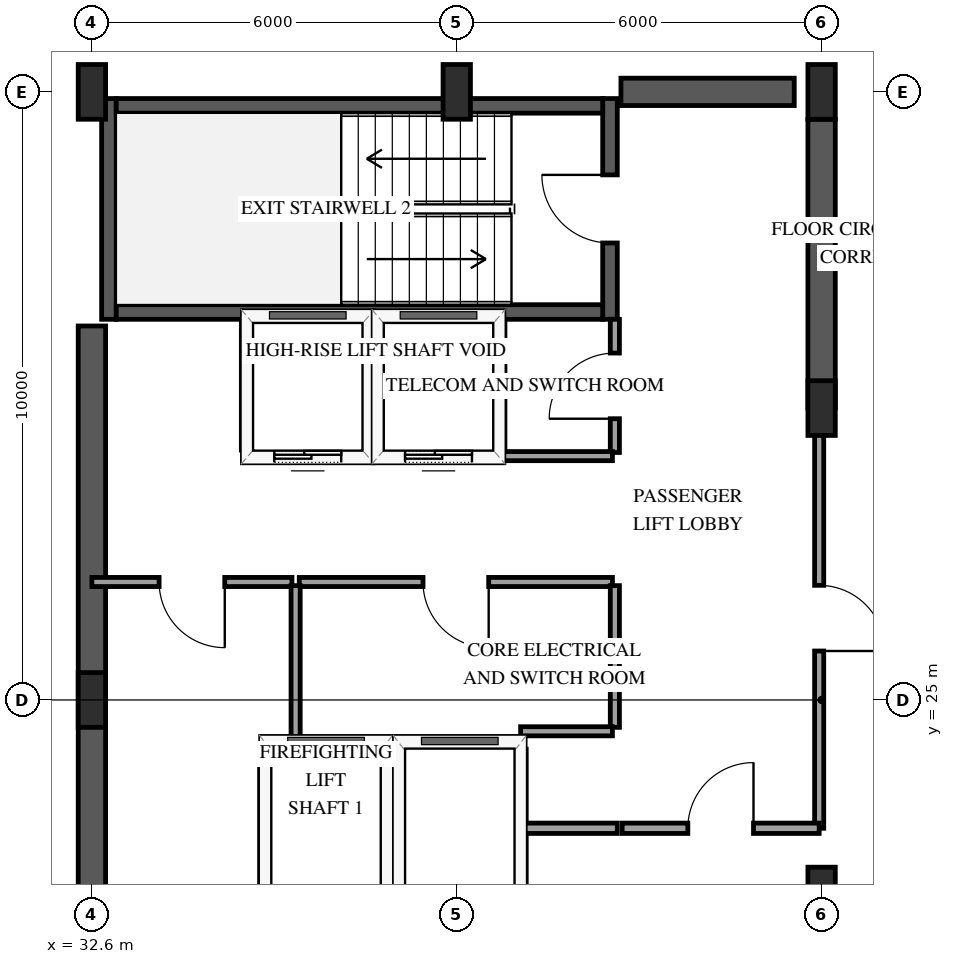
"""IFC4 building model, lengths in metres.
Left out: names, types, materials, properties, quantities, classifications, styles, units other than length and angle.
Written with IfcOpenShell. Run it as: python <this file> out.ifc"""

import sys

from ifc_helpers import new_model, si_unit, direction, frame, frame_2d, origin, origin_2d, place, context, subcontext, project, spatial, rectangle, extrude, element, fill, save


model = new_model("IFC4")
c1 = context("Model", 3, precision=1e-05, world=origin(), true_north=direction((0.0, 1.0)))
c2 = subcontext(c1, "Body", "Model", "MODEL_VIEW")
j1 = project(units=[si_unit("LENGTHUNIT", "METRE"), si_unit("PLANEANGLEUNIT", "RADIAN")], contexts=[c1])
p1 = place(None, origin())
s1 = spatial("IfcSite", under=j1, at=p1, CompositionType="ELEMENT")
p2 = place(p1, origin())
s2 = spatial("IfcBuilding", under=s1, at=p2, CompositionType="ELEMENT")
p3 = place(p2, frame((0.0, 0.0, 272.5)))
s3 = spatial("IfcBuildingStorey", under=s2, at=p3, CompositionType="ELEMENT", Elevation=272.5)
p4 = place(p3, frame((32.88, 31.26, 0.0), z_axis=(0.0, 0.0, 1.0), x_axis=(0.0, 1.0, 0.0)))
e1 = element("IfcWall", 1, at=p4, inside=s3, PredefinedType="SHEAR", context=c2, shape_type="SweptSolid", body=[
    extrude(rectangle(XDim=3.63, YDim=0.24, at=frame_2d((1.815, 0.0))), origin(), (0.0, 0.0, 1.0), 3.75),
])
p5 = place(p3, frame((41.12, 31.26, 0.0), z_axis=(0.0, 0.0, 1.0), x_axis=(0.0, 1.0, 0.0)))
e2 = element("IfcWall", 2, at=p5, inside=s3, PredefinedType="SHEAR", context=c2, shape_type="SweptSolid", body=[
    extrude(rectangle(XDim=3.63, YDim=0.24, at=frame_2d((1.815, 0.0))), origin(), (0.0, 0.0, 1.0), 3.75),
])
p6 = place(p5, frame((1.255, 0.0, 0.0)))
e3 = element("IfcOpeningElement", 3, at=p6, cuts=e2, PredefinedType="OPENING", context=c2, shape_type="SweptSolid", body=[
    extrude(rectangle(XDim=1.12, YDim=2.15, at=frame_2d((0.56, 1.075))), frame((0.0, 0.13, 0.0), z_axis=(0.0, -1.0, 0.0), x_axis=(1.0, 0.0, 0.0)), (0.0, 0.0, 1.0), 0.26),
])
for number, where, z_axis, x_axis in (
    (4, (33.0, 31.38, 0.0), (0.0, 0.0, 1.0), (1.0, 0.0, 0.0)),
    (5, (33.0, 34.77, 0.0), (0.0, 0.0, 1.0), (1.0, 0.0, 0.0)),
):
    element("IfcWall", number, at=place(p3, frame(where, z_axis=z_axis, x_axis=x_axis)), inside=s3, PredefinedType="SHEAR", context=c2, shape_type="SweptSolid", body=[
        extrude(rectangle(XDim=8.0, YDim=0.24, at=frame_2d((4.0, 0.0))), origin(), (0.0, 0.0, 1.0), 3.75),
    ])
p7 = place(p3, frame((32.6, 18.85, 0.0), z_axis=(0.0, 0.0, 1.0), x_axis=(0.0, 1.0, 0.0)))
e6 = element("IfcWall", 6, at=p7, inside=s3, PredefinedType="SHEAR", context=c2, shape_type="SweptSolid", body=[
    extrude(rectangle(XDim=12.3, YDim=0.45, at=frame_2d((6.15, 0.0))), origin(), (0.0, 0.0, 1.0), 3.75),
])
p8 = place(p3, frame((41.3, 35.0, 0.0), z_axis=(0.0, 0.0, 1.0), x_axis=(1.0, 0.0, 0.0)))
e7 = element("IfcWall", 7, at=p8, inside=s3, PredefinedType="SHEAR", context=c2, shape_type="SweptSolid", body=[
    extrude(rectangle(XDim=2.85, YDim=0.45, at=frame_2d((1.425, 0.0))), origin(), (0.0, 0.0, 1.0), 3.75),
])
p9 = place(p3, frame((44.6, 29.8, 0.0), z_axis=(0.0, 0.0, 1.0), x_axis=(0.0, 1.0, 0.0)))
e8 = element("IfcWall", 8, at=p9, inside=s3, PredefinedType="SHEAR", context=c2, shape_type="SweptSolid", body=[
    extrude(rectangle(XDim=4.75, YDim=0.45, at=frame_2d((2.375, 0.0))), origin(), (0.0, 0.0, 1.0), 3.75),
])
for number, where, z_axis, x_axis in (
    (9, (32.6, 25.0, 0.0), (0.0, 0.0, 1.0), (1.0, 0.0, 0.0)),
    (10, (32.6, 35.0, 0.0), (0.0, 0.0, 1.0), (1.0, 0.0, 0.0)),
    (11, (38.6, 35.0, 0.0), (0.0, 0.0, 1.0), (1.0, 0.0, 0.0)),
    (12, (44.6, 21.8, 0.0), (0.0, 0.0, 1.0), (1.0, 0.0, 0.0)),
    (13, (44.6, 29.8, 0.0), (0.0, 0.0, 1.0), (1.0, 0.0, 0.0)),
    (14, (44.6, 35.0, 0.0), (0.0, 0.0, 1.0), (1.0, 0.0, 0.0)),
):
    element("IfcColumn", number, at=place(p3, frame(where, z_axis=z_axis, x_axis=x_axis)), inside=s3, PredefinedType="PILASTER", context=c2, shape_type="SweptSolid", body=[
        extrude(rectangle(XDim=0.45, YDim=0.9, at=origin_2d()), origin(), (0.0, 0.0, 1.0), 3.75),
    ])
p10 = place(p3, frame((35.45, 24.3, 0.0), z_axis=(0.0, 0.0, 1.0), x_axis=(1.0, 0.0, 0.0)))
e15 = element("IfcWall", 15, at=p10, inside=s3, PredefinedType="SOLIDWALL", context=c2, shape_type="SweptSolid", body=[
    extrude(rectangle(XDim=2.0, YDim=0.185, at=frame_2d((1.0, 0.0))), origin(), (0.0, 0.0, 1.0), 3.45),
])
for number, where, z_axis, x_axis in (
    (16, (35.45, 21.81, 0.0), (0.0, 0.0, 1.0), (0.0, 1.0, 0.0)),
    (17, (37.45, 21.81, 0.0), (0.0, 0.0, 1.0), (0.0, 1.0, 0.0)),
):
    element("IfcWall", number, at=place(p3, frame(where, z_axis=z_axis, x_axis=x_axis)), inside=s3, PredefinedType="SOLIDWALL", context=c2, shape_type="SweptSolid", body=[
        extrude(rectangle(XDim=2.38, YDim=0.185, at=frame_2d((1.19, 0.0))), origin(), (0.0, 0.0, 1.0), 3.45),
    ])
p11 = place(p3, frame((37.65, 24.3, 0.0), z_axis=(0.0, 0.0, 1.0), x_axis=(1.0, 0.0, 0.0)))
e18 = element("IfcWall", 18, at=p11, inside=s3, PredefinedType="SOLIDWALL", context=c2, shape_type="SweptSolid", body=[
    extrude(rectangle(XDim=2.0, YDim=0.185, at=frame_2d((1.0, 0.0))), origin(), (0.0, 0.0, 1.0), 3.45),
])
p12 = place(p3, frame((39.65, 21.81, 0.0), z_axis=(0.0, 0.0, 1.0), x_axis=(0.0, 1.0, 0.0)))
e19 = element("IfcWall", 19, at=p12, inside=s3, PredefinedType="SOLIDWALL", context=c2, shape_type="SweptSolid", body=[
    extrude(rectangle(XDim=2.38, YDim=0.185, at=frame_2d((1.19, 0.0))), origin(), (0.0, 0.0, 1.0), 3.45),
])
p13 = place(p3, frame((35.15, 29.0, 0.0), z_axis=(0.0, 0.0, 1.0), x_axis=(1.0, 0.0, 0.0)))
e20 = element("IfcWall", 20, at=p13, inside=s3, PredefinedType="SOLIDWALL", context=c2, shape_type="SweptSolid", body=[
    extrude(rectangle(XDim=2.0, YDim=0.185, at=frame_2d((1.0, 0.0))), origin(), (0.0, 0.0, 1.0), 3.45),
])
p14 = place(p13, frame((0.45, 0.0, 0.0)))
e21 = element("IfcOpeningElement", 21, at=p14, cuts=e20, PredefinedType="OPENING", context=c2, shape_type="SweptSolid", body=[
    extrude(rectangle(XDim=1.1, YDim=2.15, at=frame_2d((0.55, 1.075))), frame((0.0, 0.103, 0.0), z_axis=(0.0, -1.0, 0.0), x_axis=(1.0, 0.0, 0.0)), (0.0, 0.0, 1.0), 0.205),
])
for number, where, z_axis, x_axis in (
    (22, (35.15, 29.11, 0.0), (0.0, 0.0, 1.0), (0.0, 1.0, 0.0)),
    (23, (37.15, 29.11, 0.0), (0.0, 0.0, 1.0), (0.0, 1.0, 0.0)),
):
    element("IfcWall", number, at=place(p3, frame(where, z_axis=z_axis, x_axis=x_axis)), inside=s3, PredefinedType="SOLIDWALL", context=c2, shape_type="SweptSolid", body=[
        extrude(rectangle(XDim=2.1, YDim=0.185, at=frame_2d((1.05, 0.0))), origin(), (0.0, 0.0, 1.0), 3.45),
    ])
p15 = place(p3, frame((37.3, 29.0, 0.0), z_axis=(0.0, 0.0, 1.0), x_axis=(1.0, 0.0, 0.0)))
e24 = element("IfcWall", 24, at=p15, inside=s3, PredefinedType="SOLIDWALL", context=c2, shape_type="SweptSolid", body=[
    extrude(rectangle(XDim=2.0, YDim=0.185, at=frame_2d((1.0, 0.0))), origin(), (0.0, 0.0, 1.0), 3.45),
])
p16 = place(p15, frame((0.45, 0.0, 0.0)))
e25 = element("IfcOpeningElement", 25, at=p16, cuts=e24, PredefinedType="OPENING", context=c2, shape_type="SweptSolid", body=[
    extrude(rectangle(XDim=1.1, YDim=2.15, at=frame_2d((0.55, 1.075))), frame((0.0, 0.103, 0.0), z_axis=(0.0, -1.0, 0.0), x_axis=(1.0, 0.0, 0.0)), (0.0, 0.0, 1.0), 0.205),
])
p17 = place(p3, frame((39.3, 29.11, 0.0), z_axis=(0.0, 0.0, 1.0), x_axis=(0.0, 1.0, 0.0)))
e26 = element("IfcWall", 26, at=p17, inside=s3, PredefinedType="SOLIDWALL", context=c2, shape_type="SweptSolid", body=[
    extrude(rectangle(XDim=2.1, YDim=0.185, at=frame_2d((1.05, 0.0))), origin(), (0.0, 0.0, 1.0), 3.45),
])
p18 = place(p3, frame((44.56, 29.8, 0.0), z_axis=(0.0, 0.0, 1.0), x_axis=(0.0, -1.0, 0.0)))
e27 = element("IfcWall", 27, at=p18, inside=s3, PredefinedType="PARTITIONING", context=c2, shape_type="SweptSolid", body=[
    extrude(rectangle(XDim=6.91, YDim=0.15, at=frame_2d((3.455, 0.0))), origin(), (0.0, 0.0, 1.0), 2.49),
])
p19 = place(p18, frame((2.915, 0.0, 0.0)))
e28 = element("IfcOpeningElement", 28, at=p19, cuts=e27, PredefinedType="OPENING", context=c2, shape_type="SweptSolid", body=[
    extrude(rectangle(XDim=1.08, YDim=2.15, at=frame_2d((0.54, 1.075))), frame((0.0, 0.085, 0.0), z_axis=(0.0, -1.0, 0.0), x_axis=(1.0, 0.0, 0.0)), (0.0, 0.0, 1.0), 0.17),
])
p20 = place(p3, frame((41.16, 26.94, 0.0), z_axis=(0.0, 0.0, 1.0), x_axis=(-1.0, 0.0, 0.0)))
e29 = element("IfcWall", 29, at=p20, inside=s3, PredefinedType="PARTITIONING", context=c2, shape_type="SweptSolid", body=[
    extrude(rectangle(XDim=5.15, YDim=0.15, at=frame_2d((2.575, 0.0))), origin(), (0.0, 0.0, 1.0), 3.45),
])
p21 = place(p20, frame((2.035, 0.0, 0.0)))
e30 = element("IfcOpeningElement", 30, at=p21, cuts=e29, PredefinedType="OPENING", context=c2, shape_type="SweptSolid", body=[
    extrude(rectangle(XDim=1.08, YDim=2.15, at=frame_2d((0.54, 1.075))), frame((0.0, 0.085, 0.0), z_axis=(0.0, -1.0, 0.0), x_axis=(1.0, 0.0, 0.0)), (0.0, 0.0, 1.0), 0.17),
])
p22 = place(p3, frame((35.89, 26.94, 0.0), z_axis=(0.0, 0.0, 1.0), x_axis=(-1.0, 0.0, 0.0)))
e31 = element("IfcWall", 31, at=p22, inside=s3, PredefinedType="PARTITIONING", context=c2, shape_type="SweptSolid", body=[
    extrude(rectangle(XDim=3.29, YDim=0.15, at=frame_2d((1.645, 0.0))), origin(), (0.0, 0.0, 1.0), 3.45),
])
p23 = place(p22, frame((1.105, 0.0, 0.0)))
e32 = element("IfcOpeningElement", 32, at=p23, cuts=e31, PredefinedType="OPENING", context=c2, shape_type="SweptSolid", body=[
    extrude(rectangle(XDim=1.08, YDim=2.15, at=frame_2d((0.54, 1.075))), frame((0.0, 0.085, 0.0), z_axis=(0.0, -1.0, 0.0), x_axis=(1.0, 0.0, 0.0)), (0.0, 0.0, 1.0), 0.17),
])
p24 = place(p3, frame((41.32, 22.89, 0.0), z_axis=(0.0, 0.0, 1.0), x_axis=(1.0, 0.0, 0.0)))
e33 = element("IfcWall", 33, at=p24, inside=s3, PredefinedType="PARTITIONING", context=c2, shape_type="SweptSolid", body=[
    extrude(rectangle(XDim=3.24, YDim=0.17, at=frame_2d((1.62, 0.0))), origin(), (0.0, 0.0, 1.0), 3.45),
])
p25 = place(p24, frame((1.08, 0.0, 0.0)))
e34 = element("IfcOpeningElement", 34, at=p25, cuts=e33, PredefinedType="OPENING", context=c2, shape_type="SweptSolid", body=[
    extrude(rectangle(XDim=1.08, YDim=2.15, at=frame_2d((0.54, 1.075))), frame((0.0, 0.095, 0.0), z_axis=(0.0, -1.0, 0.0), x_axis=(1.0, 0.0, 0.0)), (0.0, 0.0, 1.0), 0.19),
])
p26 = place(p3, frame((35.95, 26.88, 0.0), z_axis=(0.0, 0.0, 1.0), x_axis=(0.0, -1.0, 0.0)))
e35 = element("IfcWall", 35, at=p26, inside=s3, PredefinedType="PARTITIONING", context=c2, shape_type="SweptSolid", body=[
    extrude(rectangle(XDim=2.58, YDim=0.15, at=frame_2d((1.29, 0.0))), origin(), (0.0, 0.0, 1.0), 3.45),
])
p27 = place(p3, frame((41.2, 24.55, 0.0), z_axis=(0.0, 0.0, 1.0), x_axis=(0.0, 1.0, 0.0)))
e36 = element("IfcWall", 36, at=p27, inside=s3, PredefinedType="PARTITIONING", context=c2, shape_type="SweptSolid", body=[
    extrude(rectangle(XDim=2.33, YDim=0.15, at=frame_2d((1.165, 0.0))), origin(), (0.0, 0.0, 1.0), 3.45),
])
p28 = place(p3, frame((41.2, 29.07, 0.0), z_axis=(0.0, 0.0, 1.0), x_axis=(0.0, 1.0, 0.0)))
e37 = element("IfcWall", 37, at=p28, inside=s3, PredefinedType="PARTITIONING", context=c2, shape_type="SweptSolid", body=[
    extrude(rectangle(XDim=2.19, YDim=0.15, at=frame_2d((1.095, 0.0))), origin(), (0.0, 0.0, 1.0), 3.45),
])
p29 = place(p28, frame((0.555, 0.0, 0.0)))
e38 = element("IfcOpeningElement", 38, at=p29, cuts=e37, PredefinedType="OPENING", context=c2, shape_type="SweptSolid", body=[
    extrude(rectangle(XDim=1.08, YDim=2.15, at=frame_2d((0.54, 1.075))), frame((0.0, 0.085, 0.0), z_axis=(0.0, -1.0, 0.0), x_axis=(1.0, 0.0, 0.0)), (0.0, 0.0, 1.0), 0.17),
])
p30 = place(p3, frame((39.3, 29.01, 0.0), z_axis=(0.0, 0.0, 1.0), x_axis=(1.0, 0.0, 0.0)))
e39 = element("IfcWall", 39, at=p30, inside=s3, PredefinedType="PARTITIONING", context=c2, shape_type="SweptSolid", body=[
    extrude(rectangle(XDim=1.86, YDim=0.15, at=frame_2d((0.93, 0.0))), origin(), (0.0, 0.0, 1.0), 3.45),
])
p31 = place(p3, frame((39.72, 22.89, 0.0), z_axis=(0.0, 0.0, 1.0), x_axis=(1.0, 0.0, 0.0)))
e40 = element("IfcWall", 40, at=p31, inside=s3, PredefinedType="PARTITIONING", context=c2, shape_type="SweptSolid", body=[
    extrude(rectangle(XDim=1.52, YDim=0.17, at=frame_2d((0.76, 0.0))), origin(), (0.0, 0.0, 1.0), 3.45),
])
p32 = place(p3, frame((39.65, 24.485, 0.0), z_axis=(0.0, 0.0, 1.0), x_axis=(1.0, 0.0, 0.0)))
e41 = element("IfcWall", 41, at=p32, inside=s3, PredefinedType="PARTITIONING", context=c2, shape_type="SweptSolid", body=[
    extrude(rectangle(XDim=1.51, YDim=0.15, at=frame_2d((0.755, 0.0))), origin(), (0.0, 0.0, 1.0), 3.45),
])
p33 = place(p14, origin())
e42 = element("IfcDoor", 42, at=p33, inside=s3, OperationType="SLIDING_TO_LEFT", PredefinedType="DOOR", context=c2, shape_type="SweptSolid", body=[
    extrude(rectangle(XDim=1.1, YDim=2.15, at=frame_2d((0.55, 1.075))), frame((0.0, 0.025, 0.0), z_axis=(0.0, -1.0, 0.0), x_axis=(1.0, 0.0, 0.0)), (0.0, 0.0, 1.0), 0.05),
])
fill(e21, e42)
p34 = place(p16, origin())
e43 = element("IfcDoor", 43, at=p34, inside=s3, OperationType="SLIDING_TO_LEFT", PredefinedType="DOOR", context=c2, shape_type="SweptSolid", body=[
    extrude(rectangle(XDim=1.1, YDim=2.15, at=frame_2d((0.55, 1.075))), frame((0.0, 0.025, 0.0), z_axis=(0.0, -1.0, 0.0), x_axis=(1.0, 0.0, 0.0)), (0.0, 0.0, 1.0), 0.05),
])
fill(e25, e43)
p35 = place(p6, origin())
e44 = element("IfcDoor", 44, at=p35, inside=s3, OperationType="SINGLE_SWING_RIGHT", PredefinedType="DOOR", context=c2, shape_type="SweptSolid", body=[
    extrude(rectangle(XDim=1.12, YDim=2.15, at=frame_2d((0.56, 1.075))), frame((0.0, 0.025, 0.0), z_axis=(0.0, -1.0, 0.0), x_axis=(1.0, 0.0, 0.0)), (0.0, 0.0, 1.0), 0.05),
])
fill(e3, e44)
p36 = place(p19, origin())
e45 = element("IfcDoor", 45, at=p36, inside=s3, OperationType="SINGLE_SWING_RIGHT", PredefinedType="DOOR", context=c2, shape_type="SweptSolid", body=[
    extrude(rectangle(XDim=1.08, YDim=2.15, at=frame_2d((0.54, 1.075))), frame((0.0, 0.025, 0.0), z_axis=(0.0, -1.0, 0.0), x_axis=(1.0, 0.0, 0.0)), (0.0, 0.0, 1.0), 0.05),
])
fill(e28, e45)
p37 = place(p21, origin())
e46 = element("IfcDoor", 46, at=p37, inside=s3, OperationType="SINGLE_SWING_LEFT", PredefinedType="DOOR", context=c2, shape_type="SweptSolid", body=[
    extrude(rectangle(XDim=1.08, YDim=2.15, at=frame_2d((0.54, 1.075))), frame((0.0, 0.025, 0.0), z_axis=(0.0, -1.0, 0.0), x_axis=(1.0, 0.0, 0.0)), (0.0, 0.0, 1.0), 0.05),
])
fill(e30, e46)
p38 = place(p23, origin())
e47 = element("IfcDoor", 47, at=p38, inside=s3, OperationType="SINGLE_SWING_LEFT", PredefinedType="DOOR", context=c2, shape_type="SweptSolid", body=[
    extrude(rectangle(XDim=1.08, YDim=2.15, at=frame_2d((0.54, 1.075))), frame((0.0, 0.025, 0.0), z_axis=(0.0, -1.0, 0.0), x_axis=(1.0, 0.0, 0.0)), (0.0, 0.0, 1.0), 0.05),
])
fill(e32, e47)
p39 = place(p25, origin())
e48 = element("IfcDoor", 48, at=p39, inside=s3, OperationType="SINGLE_SWING_RIGHT", PredefinedType="DOOR", context=c2, shape_type="SweptSolid", body=[
    extrude(rectangle(XDim=1.08, YDim=2.15, at=frame_2d((0.54, 1.075))), frame((0.0, 0.025, 0.0), z_axis=(0.0, -1.0, 0.0), x_axis=(1.0, 0.0, 0.0)), (0.0, 0.0, 1.0), 0.05),
])
fill(e34, e48)
p40 = place(p29, origin())
e49 = element("IfcDoor", 49, at=p40, inside=s3, OperationType="SINGLE_SWING_LEFT", PredefinedType="DOOR", context=c2, shape_type="SweptSolid", body=[
    extrude(rectangle(XDim=1.08, YDim=2.15, at=frame_2d((0.54, 1.075))), frame((0.0, 0.025, 0.0), z_axis=(0.0, -1.0, 0.0), x_axis=(1.0, 0.0, 0.0)), (0.0, 0.0, 1.0), 0.05),
])
fill(e38, e49)
save(model, sys.argv[1])
